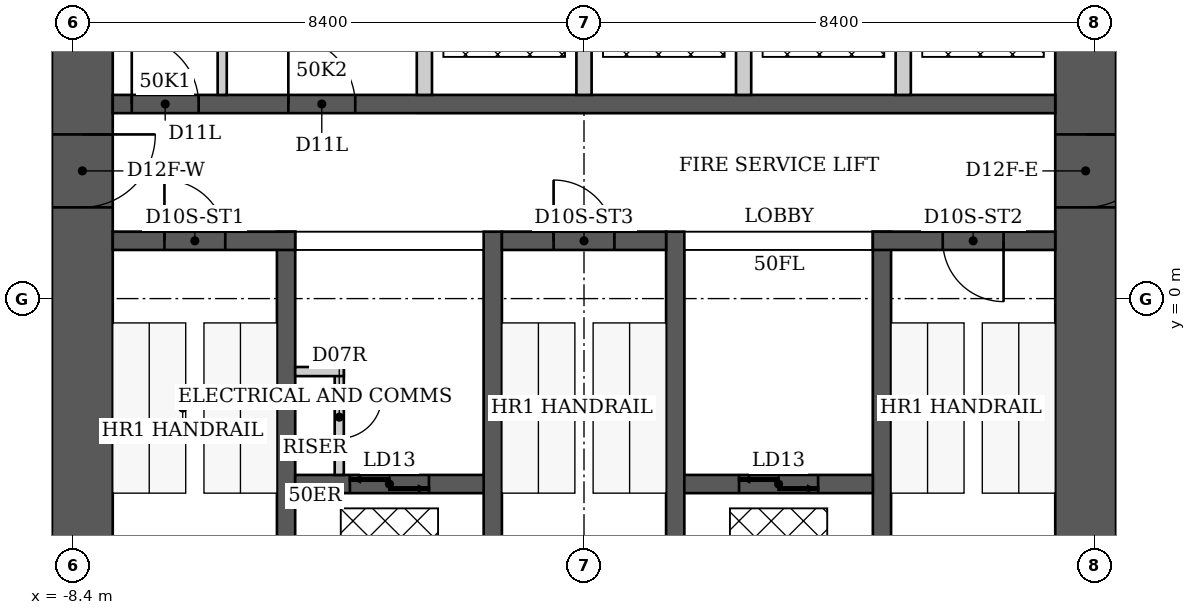
"""IFC4 building model, lengths in metres.
Left out: names, types, materials, properties, quantities, classifications, styles, units other than length and angle.
Written with IfcOpenShell. Run it as: python <this file> out.ifc"""

import sys

from ifc_helpers import new_model, si_unit, direction, frame, frame_2d, origin, place, context, subcontext, project, spatial, rectangle, extrude, element, fill, save


model = new_model("IFC4")
c1 = context("Model", 3, precision=1e-05, world=origin(), true_north=direction((0.0, 1.0)))
c2 = subcontext(c1, "Body", "Model", "MODEL_VIEW")
j1 = project(units=[si_unit("LENGTHUNIT", "METRE"), si_unit("PLANEANGLEUNIT", "RADIAN")], contexts=[c1])
p1 = place(None, origin())
s1 = spatial("IfcSite", under=j1, at=p1, CompositionType="ELEMENT")
p2 = place(p1, origin())
s2 = spatial("IfcBuilding", under=s1, at=p2, CompositionType="ELEMENT")
p3 = place(p2, frame((0.0, 0.0, 202.2)))
s3 = spatial("IfcBuildingStorey", under=s2, at=p3, CompositionType="ELEMENT", Elevation=202.2)
p4 = place(p3, frame((-8.25, -6.1, 0.0), z_axis=(0.0, 0.0, 1.0), x_axis=(0.0, 1.0, 0.0)))
e1 = element("IfcWall", 1, at=p4, inside=s3, PredefinedType="SHEAR", context=c2, shape_type="SweptSolid", body=[
    extrude(rectangle(XDim=12.2, YDim=1.0, at=frame_2d((6.1, 0.0))), origin(), (0.0, 0.0, 1.0), 3.8),
])
p5 = place(p4, frame((7.6, 0.0, 0.0)))
e2 = element("IfcOpeningElement", 2, at=p5, cuts=e1, PredefinedType="OPENING", context=c2, shape_type="SweptSolid", body=[
    extrude(rectangle(XDim=1.2, YDim=2.2, at=frame_2d((0.6, 1.1))), frame((0.0, 0.5, 0.0), z_axis=(0.0, -1.0, 0.0), x_axis=(1.0, 0.0, 0.0)), (0.0, 0.0, 1.0), 1.0),
])
p6 = place(p3, frame((8.25, -6.1, 0.0), z_axis=(0.0, 0.0, 1.0), x_axis=(0.0, 1.0, 0.0)))
e3 = element("IfcWall", 3, at=p6, inside=s3, PredefinedType="SHEAR", context=c2, shape_type="SweptSolid", body=[
    extrude(rectangle(XDim=12.2, YDim=1.0, at=frame_2d((6.1, 0.0))), origin(), (0.0, 0.0, 1.0), 3.8),
])
p7 = place(p6, frame((7.6, 0.0, 0.0)))
e4 = element("IfcOpeningElement", 4, at=p7, cuts=e3, PredefinedType="OPENING", context=c2, shape_type="SweptSolid", body=[
    extrude(rectangle(XDim=1.2, YDim=2.2, at=frame_2d((0.6, 1.1))), frame((0.0, 0.5, 0.0), z_axis=(0.0, -1.0, 0.0), x_axis=(1.0, 0.0, 0.0)), (0.0, 0.0, 1.0), 1.0),
])
for number, where, z_axis, x_axis in (
    (5, (-4.9, -6.1, 0.0), (0.0, 0.0, 1.0), (0.0, 1.0, 0.0)),
    (6, (-1.5, -6.1, 0.0), (0.0, 0.0, 1.0), (0.0, 1.0, 0.0)),
    (7, (1.5, -6.1, 0.0), (0.0, 0.0, 1.0), (0.0, 1.0, 0.0)),
    (8, (4.9, -6.1, 0.0), (0.0, 0.0, 1.0), (0.0, 1.0, 0.0)),
):
    element("IfcWall", number, at=place(p3, frame(where, z_axis=z_axis, x_axis=x_axis)), inside=s3, PredefinedType="SHEAR", context=c2, shape_type="SweptSolid", body=[
        extrude(rectangle(XDim=7.2, YDim=0.3, at=frame_2d((3.6, 0.0))), origin(), (0.0, 0.0, 1.0), 3.8),
    ])
p8 = place(p3, frame((-7.75, 0.95, 0.0), z_axis=(0.0, 0.0, 1.0), x_axis=(1.0, 0.0, 0.0)))
e9 = element("IfcWall", 9, at=p8, inside=s3, PredefinedType="SHEAR", context=c2, shape_type="SweptSolid", body=[
    extrude(rectangle(XDim=3.0, YDim=0.3, at=frame_2d((1.5, 0.0))), origin(), (0.0, 0.0, 1.0), 3.8),
])
p9 = place(p8, frame((0.85, 0.0, 0.0)))
e10 = element("IfcOpeningElement", 10, at=p9, cuts=e9, PredefinedType="OPENING", context=c2, shape_type="SweptSolid", body=[
    extrude(rectangle(XDim=1.0, YDim=2.2, at=frame_2d((0.5, 1.1))), frame((0.0, 0.15, 0.0), z_axis=(0.0, -1.0, 0.0), x_axis=(1.0, 0.0, 0.0)), (0.0, 0.0, 1.0), 0.3),
])
p10 = place(p3, frame((-1.35, 0.95, 0.0), z_axis=(0.0, 0.0, 1.0), x_axis=(1.0, 0.0, 0.0)))
e11 = element("IfcWall", 11, at=p10, inside=s3, PredefinedType="SHEAR", context=c2, shape_type="SweptSolid", body=[
    extrude(rectangle(XDim=2.7, YDim=0.3, at=frame_2d((1.35, 0.0))), origin(), (0.0, 0.0, 1.0), 3.8),
])
p11 = place(p10, frame((0.85, 0.0, 0.0)))
e12 = element("IfcOpeningElement", 12, at=p11, cuts=e11, PredefinedType="OPENING", context=c2, shape_type="SweptSolid", body=[
    extrude(rectangle(XDim=1.0, YDim=2.2, at=frame_2d((0.5, 1.1))), frame((0.0, 0.15, 0.0), z_axis=(0.0, -1.0, 0.0), x_axis=(1.0, 0.0, 0.0)), (0.0, 0.0, 1.0), 0.3),
])
p12 = place(p3, frame((4.75, 0.95, 0.0), z_axis=(0.0, 0.0, 1.0), x_axis=(1.0, 0.0, 0.0)))
e13 = element("IfcWall", 13, at=p12, inside=s3, PredefinedType="SHEAR", context=c2, shape_type="SweptSolid", body=[
    extrude(rectangle(XDim=3.0, YDim=0.3, at=frame_2d((1.5, 0.0))), origin(), (0.0, 0.0, 1.0), 3.8),
])
p13 = place(p12, frame((1.15, 0.0, 0.0)))
e14 = element("IfcOpeningElement", 14, at=p13, cuts=e13, PredefinedType="OPENING", context=c2, shape_type="SweptSolid", body=[
    extrude(rectangle(XDim=1.0, YDim=2.2, at=frame_2d((0.5, 1.1))), frame((0.0, 0.15, 0.0), z_axis=(0.0, -1.0, 0.0), x_axis=(1.0, 0.0, 0.0)), (0.0, 0.0, 1.0), 0.3),
])
p14 = place(p3, frame((-4.75, -3.05, 0.0), z_axis=(0.0, 0.0, 1.0), x_axis=(1.0, 0.0, 0.0)))
e15 = element("IfcWall", 15, at=p14, inside=s3, PredefinedType="SHEAR", context=c2, shape_type="SweptSolid", body=[
    extrude(rectangle(XDim=3.1, YDim=0.3, at=frame_2d((1.55, 0.0))), origin(), (0.0, 0.0, 1.0), 3.8),
])
p15 = place(p14, frame((0.9, 0.0, 0.0)))
e16 = element("IfcOpeningElement", 16, at=p15, cuts=e15, PredefinedType="OPENING", context=c2, shape_type="SweptSolid", body=[
    extrude(rectangle(XDim=1.3, YDim=2.1, at=frame_2d((0.65, 1.05))), frame((0.0, 0.15, 0.0), z_axis=(0.0, -1.0, 0.0), x_axis=(1.0, 0.0, 0.0)), (0.0, 0.0, 1.0), 0.3),
])
p16 = place(p3, frame((1.65, -3.05, 0.0), z_axis=(0.0, 0.0, 1.0), x_axis=(1.0, 0.0, 0.0)))
e17 = element("IfcWall", 17, at=p16, inside=s3, PredefinedType="SHEAR", context=c2, shape_type="SweptSolid", body=[
    extrude(rectangle(XDim=3.1, YDim=0.3, at=frame_2d((1.55, 0.0))), origin(), (0.0, 0.0, 1.0), 3.8),
])
p17 = place(p16, frame((0.9, 0.0, 0.0)))
e18 = element("IfcOpeningElement", 18, at=p17, cuts=e17, PredefinedType="OPENING", context=c2, shape_type="SweptSolid", body=[
    extrude(rectangle(XDim=1.3, YDim=2.1, at=frame_2d((0.65, 1.05))), frame((0.0, 0.15, 0.0), z_axis=(0.0, -1.0, 0.0), x_axis=(1.0, 0.0, 0.0)), (0.0, 0.0, 1.0), 0.3),
])
p18 = place(p3, frame((-7.75, 3.2, 0.0), z_axis=(0.0, 0.0, 1.0), x_axis=(1.0, 0.0, 0.0)))
e19 = element("IfcWall", 19, at=p18, inside=s3, PredefinedType="SHEAR", context=c2, shape_type="SweptSolid", body=[
    extrude(rectangle(XDim=15.5, YDim=0.3, at=frame_2d((7.75, 0.0))), origin(), (0.0, 0.0, 1.0), 3.8),
])
p19 = place(p18, frame((0.312, 0.0, 0.0)))
e20 = element("IfcOpeningElement", 20, at=p19, cuts=e19, PredefinedType="OPENING", context=c2, shape_type="SweptSolid", body=[
    extrude(rectangle(XDim=1.1, YDim=2.2, at=frame_2d((0.55, 1.1))), frame((0.0, 0.15, 0.0), z_axis=(0.0, -1.0, 0.0), x_axis=(1.0, 0.0, 0.0)), (0.0, 0.0, 1.0), 0.3),
])
p20 = place(p18, frame((2.887, 0.0, 0.0)))
e21 = element("IfcOpeningElement", 21, at=p20, cuts=e19, PredefinedType="OPENING", context=c2, shape_type="SweptSolid", body=[
    extrude(rectangle(XDim=1.1, YDim=2.2, at=frame_2d((0.55, 1.1))), frame((0.0, 0.15, 0.0), z_axis=(0.0, -1.0, 0.0), x_axis=(1.0, 0.0, 0.0)), (0.0, 0.0, 1.0), 0.3),
])
for number, where, z_axis, x_axis in (
    (22, (-2.625, 3.35, 0.0), (0.0, 0.0, 1.0), (0.0, 1.0, 0.0)),
    (23, (0.0, 3.35, 0.0), (0.0, 0.0, 1.0), (0.0, 1.0, 0.0)),
    (24, (2.625, 3.35, 0.0), (0.0, 0.0, 1.0), (0.0, 1.0, 0.0)),
    (25, (5.25, 3.35, 0.0), (0.0, 0.0, 1.0), (0.0, 1.0, 0.0)),
):
    element("IfcWall", number, at=place(p3, frame(where, z_axis=z_axis, x_axis=x_axis)), inside=s3, PredefinedType="PARTITIONING", context=c2, shape_type="SweptSolid", body=[
        extrude(rectangle(XDim=2.75, YDim=0.25, at=frame_2d((1.375, 0.0))), origin(), (0.0, 0.0, 1.0), 3.8),
    ])
p21 = place(p3, frame((-4.025, -2.9, 0.0), z_axis=(0.0, 0.0, 1.0), x_axis=(0.0, 1.0, 0.0)))
e26 = element("IfcWall", 26, at=p21, inside=s3, PredefinedType="PARTITIONING", context=c2, shape_type="SweptSolid", body=[
    extrude(rectangle(XDim=1.775, YDim=0.15, at=frame_2d((0.887, 0.0))), origin(), (0.0, 0.0, 1.0), 3.64),
])
p22 = place(p21, frame((0.6, 0.0, 0.0)))
e27 = element("IfcOpeningElement", 27, at=p22, cuts=e26, PredefinedType="OPENING", context=c2, shape_type="SweptSolid", body=[
    extrude(rectangle(XDim=0.7, YDim=2.1, at=frame_2d((0.35, 1.05))), frame((0.0, 0.075, 0.0), z_axis=(0.0, -1.0, 0.0), x_axis=(1.0, 0.0, 0.0)), (0.0, 0.0, 1.0), 0.15),
])
p23 = place(p3, frame((-4.75, -1.2, 0.0), z_axis=(0.0, 0.0, 1.0), x_axis=(1.0, 0.0, 0.0)))
e28 = element("IfcWall", 28, at=p23, inside=s3, PredefinedType="PARTITIONING", context=c2, shape_type="SweptSolid", body=[
    extrude(rectangle(XDim=0.8, YDim=0.15, at=frame_2d((0.4, 0.0))), origin(), (0.0, 0.0, 1.0), 3.64),
])
p24 = place(p3, frame((-5.95, 3.35, 0.0), z_axis=(0.0, 0.0, 1.0), x_axis=(0.0, 1.0, 0.0)))
e29 = element("IfcWall", 29, at=p24, inside=s3, PredefinedType="PARTITIONING", context=c2, shape_type="SweptSolid", body=[
    extrude(rectangle(XDim=2.75, YDim=0.15, at=frame_2d((1.375, 0.0))), origin(), (0.0, 0.0, 1.0), 3.64),
])
p25 = place(p9, origin())
e30 = element("IfcDoor", 30, at=p25, inside=s3, OperationType="SINGLE_SWING_LEFT", PredefinedType="DOOR", context=c2, shape_type="SweptSolid", body=[
    extrude(rectangle(XDim=1.0, YDim=2.2, at=frame_2d((0.5, 1.1))), frame((0.0, 0.025, 0.0), z_axis=(0.0, -1.0, 0.0), x_axis=(1.0, 0.0, 0.0)), (0.0, 0.0, 1.0), 0.05),
])
fill(e10, e30)
p26 = place(p11, origin())
e31 = element("IfcDoor", 31, at=p26, inside=s3, OperationType="SINGLE_SWING_LEFT", PredefinedType="DOOR", context=c2, shape_type="SweptSolid", body=[
    extrude(rectangle(XDim=1.0, YDim=2.2, at=frame_2d((0.5, 1.1))), frame((0.0, 0.025, 0.0), z_axis=(0.0, -1.0, 0.0), x_axis=(1.0, 0.0, 0.0)), (0.0, 0.0, 1.0), 0.05),
])
fill(e12, e31)
p27 = place(p13, origin())
e32 = element("IfcDoor", 32, at=p27, inside=s3, OperationType="SINGLE_SWING_RIGHT", PredefinedType="DOOR", context=c2, shape_type="SweptSolid", body=[
    extrude(rectangle(XDim=1.0, YDim=2.2, at=frame_2d((0.5, 1.1))), frame((0.0, 0.025, 0.0), z_axis=(0.0, -1.0, 0.0), x_axis=(1.0, 0.0, 0.0)), (0.0, 0.0, 1.0), 0.05),
])
fill(e14, e32)
p28 = place(p5, origin())
e33 = element("IfcDoor", 33, at=p28, inside=s3, OperationType="SINGLE_SWING_RIGHT", PredefinedType="DOOR", context=c2, shape_type="SweptSolid", body=[
    extrude(rectangle(XDim=1.2, YDim=2.2, at=frame_2d((0.6, 1.1))), frame((0.0, 0.025, 0.0), z_axis=(0.0, -1.0, 0.0), x_axis=(1.0, 0.0, 0.0)), (0.0, 0.0, 1.0), 0.05),
])
fill(e2, e33)
p29 = place(p7, origin())
e34 = element("IfcDoor", 34, at=p29, inside=s3, OperationType="SINGLE_SWING_RIGHT", PredefinedType="DOOR", context=c2, shape_type="SweptSolid", body=[
    extrude(rectangle(XDim=1.2, YDim=2.2, at=frame_2d((0.6, 1.1))), frame((0.0, 0.025, 0.0), z_axis=(0.0, -1.0, 0.0), x_axis=(1.0, 0.0, 0.0)), (0.0, 0.0, 1.0), 0.05),
])
fill(e4, e34)
p30 = place(p22, origin())
e35 = element("IfcDoor", 35, at=p30, inside=s3, OperationType="SINGLE_SWING_RIGHT", PredefinedType="DOOR", context=c2, shape_type="SweptSolid", body=[
    extrude(rectangle(XDim=0.7, YDim=2.1, at=frame_2d((0.35, 1.05))), frame((0.0, 0.025, 0.0), z_axis=(0.0, -1.0, 0.0), x_axis=(1.0, 0.0, 0.0)), (0.0, 0.0, 1.0), 0.05),
])
fill(e27, e35)
p31 = place(p19, origin())
e36 = element("IfcDoor", 36, at=p31, inside=s3, OperationType="SINGLE_SWING_LEFT", PredefinedType="DOOR", context=c2, shape_type="SweptSolid", body=[
    extrude(rectangle(XDim=1.1, YDim=2.2, at=frame_2d((0.55, 1.1))), frame((0.0, 0.025, 0.0), z_axis=(0.0, -1.0, 0.0), x_axis=(1.0, 0.0, 0.0)), (0.0, 0.0, 1.0), 0.05),
])
fill(e20, e36)
p32 = place(p20, origin())
e37 = element("IfcDoor", 37, at=p32, inside=s3, OperationType="SINGLE_SWING_LEFT", PredefinedType="DOOR", context=c2, shape_type="SweptSolid", body=[
    extrude(rectangle(XDim=1.1, YDim=2.2, at=frame_2d((0.55, 1.1))), frame((0.0, 0.025, 0.0), z_axis=(0.0, -1.0, 0.0), x_axis=(1.0, 0.0, 0.0)), (0.0, 0.0, 1.0), 0.05),
])
fill(e21, e37)
p33 = place(p15, origin())
e38 = element("IfcDoor", 38, at=p33, inside=s3, OperationType="DOUBLE_DOOR_SLIDING", PredefinedType="DOOR", context=c2, shape_type="SweptSolid", body=[
    extrude(rectangle(XDim=1.3, YDim=2.1, at=frame_2d((0.65, 1.05))), frame((0.0, 0.025, 0.0), z_axis=(0.0, -1.0, 0.0), x_axis=(1.0, 0.0, 0.0)), (0.0, 0.0, 1.0), 0.05),
])
fill(e16, e38)
p34 = place(p17, origin())
e39 = element("IfcDoor", 39, at=p34, inside=s3, OperationType="DOUBLE_DOOR_SLIDING", PredefinedType="DOOR", context=c2, shape_type="SweptSolid", body=[
    extrude(rectangle(XDim=1.3, YDim=2.1, at=frame_2d((0.65, 1.05))), frame((0.0, 0.025, 0.0), z_axis=(0.0, -1.0, 0.0), x_axis=(1.0, 0.0, 0.0)), (0.0, 0.0, 1.0), 0.05),
])
fill(e18, e39)
save(model, sys.argv[1])
